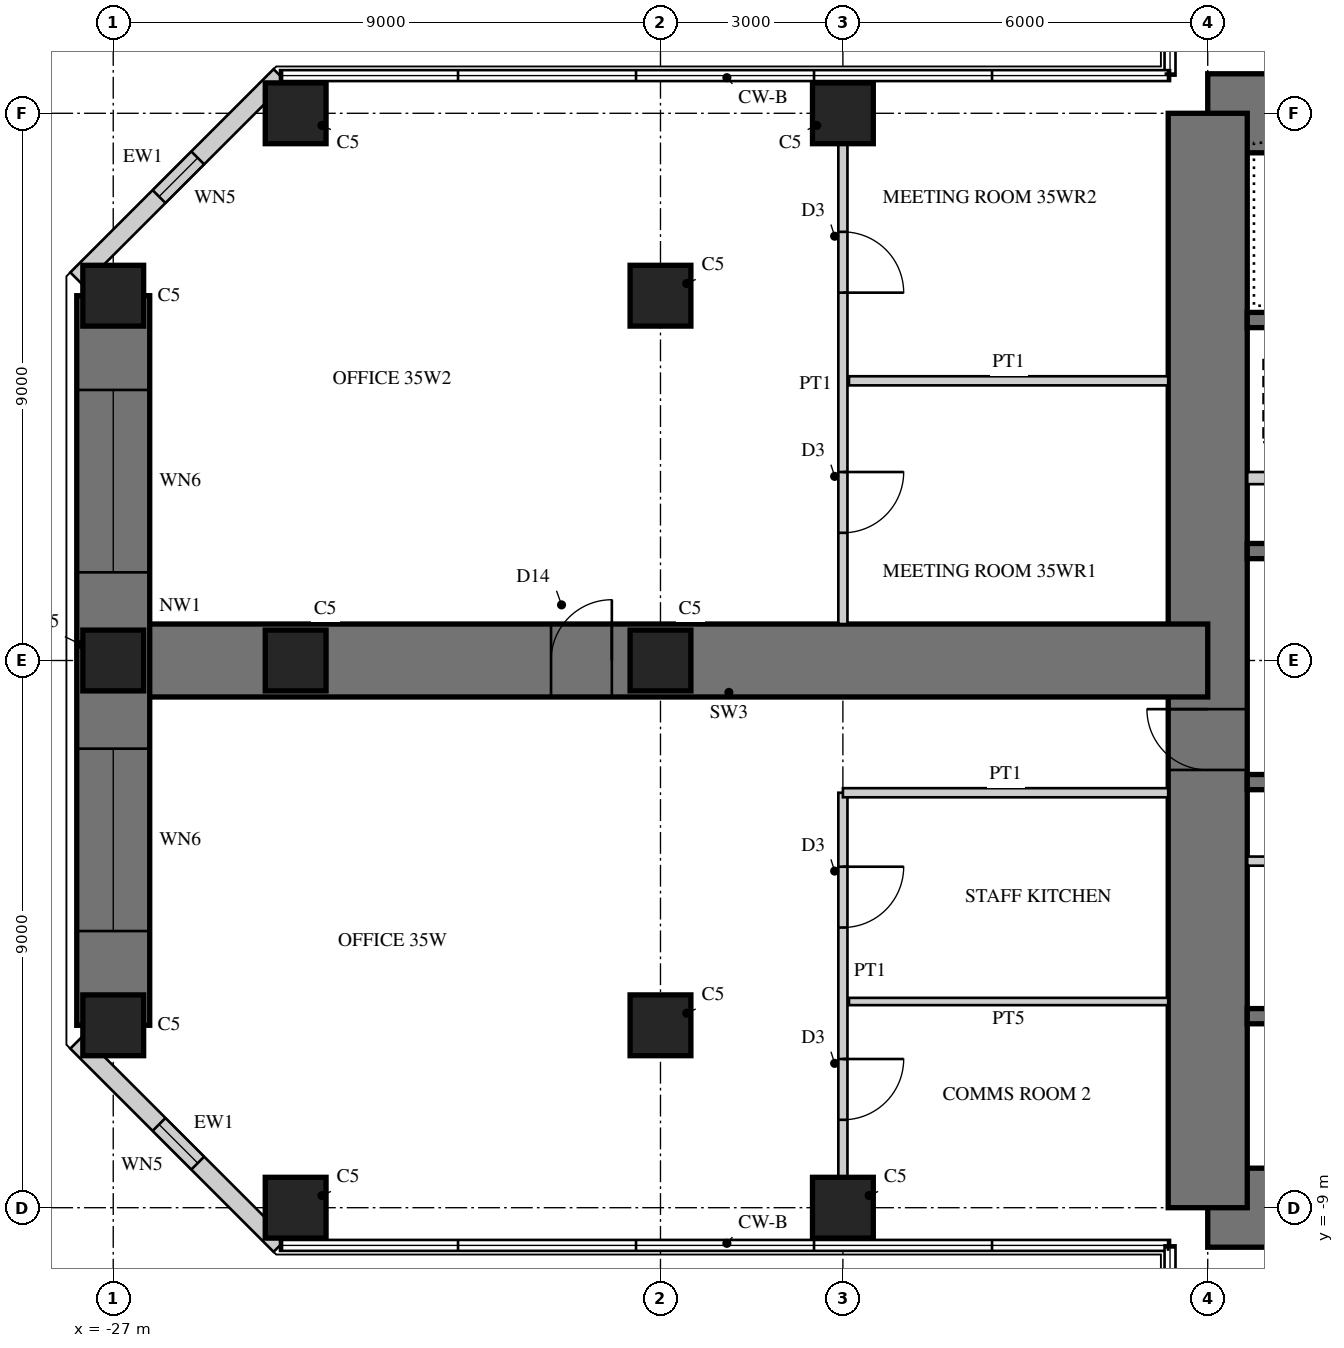
"""IFC4 building model, lengths in metres.
Left out: names, types, materials, properties, quantities, classifications, styles, units other than length and angle.
Written with IfcOpenShell. Run it as: python <this file> out.ifc"""

import sys

from ifc_helpers import new_model, si_unit, direction, frame, frame_2d, origin, origin_2d, place, context, subcontext, project, spatial, rectangle, hollow_rectangle, extrude, element, fill, save


model = new_model("IFC4")
c1 = context("Model", 3, precision=1e-05, world=origin(), true_north=direction((0.0, 1.0)))
c2 = subcontext(c1, "Body", "Model", "MODEL_VIEW")
j1 = project(units=[si_unit("LENGTHUNIT", "METRE"), si_unit("PLANEANGLEUNIT", "RADIAN")], contexts=[c1])
p1 = place(None, origin())
s1 = spatial("IfcSite", under=j1, at=p1, CompositionType="ELEMENT")
p2 = place(p1, origin())
s2 = spatial("IfcBuilding", under=s1, at=p2, CompositionType="ELEMENT")
p3 = place(p2, frame((0.0, 0.0, 144.5)))
s3 = spatial("IfcBuildingStorey", under=s2, at=p3, CompositionType="ELEMENT", Elevation=144.5)
p4 = place(p3, frame((9.0, 9.0, 0.0), z_axis=(0.0, 0.0, 1.0), x_axis=(-1.0, 0.0, 0.0)))
e1 = element("IfcWall", 1, at=p4, inside=s3, PredefinedType="SHEAR", context=c2, shape_type="SweptSolid", body=[
    extrude(rectangle(XDim=18.0, YDim=1.3, at=frame_2d((9.0, 0.0))), origin(), (0.0, 0.0, 1.0), 4.0),
])
p5 = place(p4, frame((9.8, 0.0, 0.0)))
e2 = element("IfcOpeningElement", 2, at=p5, cuts=e1, PredefinedType="OPENING", context=c2, shape_type="SweptSolid", body=[
    extrude(rectangle(XDim=1.0, YDim=2.4, at=frame_2d((0.5, 1.2))), frame((0.0, 0.66, 0.0), z_axis=(0.0, -1.0, 0.0), x_axis=(1.0, 0.0, 0.0)), (0.0, 0.0, 1.0), 1.32),
])
p6 = place(p3, frame((-9.0, -9.0, 0.0), z_axis=(0.0, 0.0, 1.0), x_axis=(1.0, 0.0, 0.0)))
e3 = element("IfcWall", 3, at=p6, inside=s3, PredefinedType="SHEAR", context=c2, shape_type="SweptSolid", body=[
    extrude(rectangle(XDim=18.0, YDim=1.3, at=frame_2d((9.0, 0.0))), origin(), (0.0, 0.0, 1.0), 4.0),
])
p7 = place(p6, frame((9.8, 0.0, 0.0)))
e4 = element("IfcOpeningElement", 4, at=p7, cuts=e3, PredefinedType="OPENING", context=c2, shape_type="SweptSolid", body=[
    extrude(rectangle(XDim=1.0, YDim=2.4, at=frame_2d((0.5, 1.2))), frame((0.0, 0.66, 0.0), z_axis=(0.0, -1.0, 0.0), x_axis=(1.0, 0.0, 0.0)), (0.0, 0.0, 1.0), 1.32),
])
p8 = place(p3, frame((-9.0, 9.0, 0.0), z_axis=(0.0, 0.0, 1.0), x_axis=(0.0, -1.0, 0.0)))
e5 = element("IfcWall", 5, at=p8, inside=s3, PredefinedType="SHEAR", context=c2, shape_type="SweptSolid", body=[
    extrude(rectangle(XDim=18.0, YDim=1.3, at=frame_2d((9.0, 0.0))), origin(), (0.0, 0.0, 1.0), 4.0),
])
p9 = place(p8, frame((9.8, 0.0, 0.0)))
e6 = element("IfcOpeningElement", 6, at=p9, cuts=e5, PredefinedType="OPENING", context=c2, shape_type="SweptSolid", body=[
    extrude(rectangle(XDim=1.0, YDim=2.4, at=frame_2d((0.5, 1.2))), frame((0.0, 0.66, 0.0), z_axis=(0.0, -1.0, 0.0), x_axis=(1.0, 0.0, 0.0)), (0.0, 0.0, 1.0), 1.32),
])
p10 = place(p3, frame((-2.125, 1.8, 0.0), z_axis=(0.0, 0.0, 1.0), x_axis=(-1.0, 0.0, 0.0)))
e7 = element("IfcWall", 7, at=p10, inside=s3, PredefinedType="SHEAR", context=c2, shape_type="SweptSolid", body=[
    extrude(rectangle(XDim=6.225, YDim=0.25, at=frame_2d((3.113, 0.0))), origin(), (0.0, 0.0, 1.0), 4.0),
])
p11 = place(p3, frame((-2.125, 5.6, 0.0), z_axis=(0.0, 0.0, 1.0), x_axis=(-1.0, 0.0, 0.0)))
e8 = element("IfcWall", 8, at=p11, inside=s3, PredefinedType="SHEAR", context=c2, shape_type="SweptSolid", body=[
    extrude(rectangle(XDim=6.225, YDim=0.25, at=frame_2d((3.113, 0.0))), origin(), (0.0, 0.0, 1.0), 4.0),
])
p12 = place(p11, frame((0.175, 0.0, 0.0)))
e9 = element("IfcOpeningElement", 9, at=p12, cuts=e8, PredefinedType="OPENING", context=c2, shape_type="SweptSolid", body=[
    extrude(rectangle(XDim=1.0, YDim=2.1, at=frame_2d((0.5, 1.05))), frame((0.0, 0.135, 0.0), z_axis=(0.0, -1.0, 0.0), x_axis=(1.0, 0.0, 0.0)), (0.0, 0.0, 1.0), 0.27),
])
p13 = place(p3, frame((-5.725, 3.0, 0.0), z_axis=(0.0, 0.0, 1.0), x_axis=(-1.0, 0.0, 0.0)))
e10 = element("IfcWall", 10, at=p13, inside=s3, PredefinedType="PARTITIONING", context=c2, shape_type="SweptSolid", body=[
    extrude(rectangle(XDim=2.625, YDim=0.2, at=frame_2d((1.312, 0.0))), origin(), (0.0, 0.0, 1.0), 4.0),
])
for number, where, z_axis, x_axis in (
    (11, (-1.925, -2.0, 0.0), (0.0, 0.0, 1.0), (-1.0, 0.0, 0.0)),
    (12, (-1.925, -5.85, 0.0), (0.0, 0.0, 1.0), (-1.0, 0.0, 0.0)),
):
    element("IfcWall", number, at=place(p3, frame(where, z_axis=z_axis, x_axis=x_axis)), inside=s3, PredefinedType="SHEAR", context=c2, shape_type="SweptSolid", body=[
        extrude(rectangle(XDim=6.425, YDim=0.25, at=frame_2d((3.212, 0.0))), origin(), (0.0, 0.0, 1.0), 4.0),
    ])
p14 = place(p3, frame((-1.925, -3.3, 0.0), z_axis=(0.0, 0.0, 1.0), x_axis=(-1.0, 0.0, 0.0)))
e13 = element("IfcWall", 13, at=p14, inside=s3, PredefinedType="PARTITIONING", context=c2, shape_type="SweptSolid", body=[
    extrude(rectangle(XDim=6.425, YDim=0.15, at=frame_2d((3.212, 0.0))), origin(), (0.0, 0.0, 1.0), 4.0),
])
p15 = place(p14, frame((0.075, 0.0, 0.0)))
e14 = element("IfcOpeningElement", 14, at=p15, cuts=e13, PredefinedType="OPENING", context=c2, shape_type="SweptSolid", body=[
    extrude(rectangle(XDim=0.8, YDim=2.1, at=frame_2d((0.4, 1.05))), frame((0.0, 0.085, 0.0), z_axis=(0.0, -1.0, 0.0), x_axis=(1.0, 0.0, 0.0)), (0.0, 0.0, 1.0), 0.17),
])
p16 = place(p14, frame((3.675, 0.0, 0.0)))
e15 = element("IfcOpeningElement", 15, at=p16, cuts=e13, PredefinedType="OPENING", context=c2, shape_type="SweptSolid", body=[
    extrude(rectangle(XDim=0.8, YDim=2.1, at=frame_2d((0.4, 1.05))), frame((0.0, 0.085, 0.0), z_axis=(0.0, -1.0, 0.0), x_axis=(1.0, 0.0, 0.0)), (0.0, 0.0, 1.0), 0.17),
])
p17 = place(p3, frame((-9.0, 0.0, 0.0), z_axis=(0.0, 0.0, 1.0), x_axis=(-1.0, 0.0, 0.0)))
e16 = element("IfcWall", 16, at=p17, inside=s3, PredefinedType="SHEAR", context=c2, shape_type="SweptSolid", body=[
    extrude(rectangle(XDim=18.0, YDim=1.2, at=frame_2d((9.0, 0.0))), origin(), (0.0, 0.0, 1.0), 4.0),
])
p18 = place(p17, frame((9.8, 0.0, 0.0)))
e17 = element("IfcOpeningElement", 17, at=p18, cuts=e16, PredefinedType="OPENING", context=c2, shape_type="SweptSolid", body=[
    extrude(rectangle(XDim=1.0, YDim=2.2, at=frame_2d((0.5, 1.1))), frame((0.0, 0.61, 0.0), z_axis=(0.0, -1.0, 0.0), x_axis=(1.0, 0.0, 0.0)), (0.0, 0.0, 1.0), 1.22),
])
p19 = place(p3, frame((-27.0, 6.0, 0.0), z_axis=(0.0, 0.0, 1.0), x_axis=(0.0, -1.0, 0.0)))
e18 = element("IfcWall", 18, at=p19, inside=s3, PredefinedType="SHEAR", context=c2, shape_type="SweptSolid", body=[
    extrude(rectangle(XDim=12.0, YDim=1.2, at=frame_2d((6.0, 0.0))), origin(), (0.0, 0.0, 1.0), 4.0),
])
p20 = place(p19, frame((1.55, 0.0, 0.6)))
e19 = element("IfcOpeningElement", 19, at=p20, cuts=e18, PredefinedType="OPENING", context=c2, shape_type="SweptSolid", body=[
    extrude(rectangle(XDim=3.0, YDim=2.4, at=frame_2d((1.5, 1.2))), frame((0.0, 0.61, 0.0), z_axis=(0.0, -1.0, 0.0), x_axis=(1.0, 0.0, 0.0)), (0.0, 0.0, 1.0), 1.22),
])
p21 = place(p19, frame((7.45, 0.0, 0.6)))
e20 = element("IfcOpeningElement", 20, at=p21, cuts=e18, PredefinedType="OPENING", context=c2, shape_type="SweptSolid", body=[
    extrude(rectangle(XDim=3.0, YDim=2.4, at=frame_2d((1.5, 1.2))), frame((0.0, 0.61, 0.0), z_axis=(0.0, -1.0, 0.0), x_axis=(1.0, 0.0, 0.0)), (0.0, 0.0, 1.0), 1.22),
])
for number, where, z_axis, x_axis in (
    (21, (-15.0, 9.0, 0.0), (0.0, 0.0, 1.0), (1.0, 0.0, 0.0)),
    (22, (-24.0, 9.0, 0.0), (0.0, 0.0, 1.0), (1.0, 0.0, 0.0)),
    (23, (-15.0, -9.0, 0.0), (0.0, 0.0, 1.0), (1.0, 0.0, 0.0)),
    (24, (-24.0, -9.0, 0.0), (0.0, 0.0, 1.0), (1.0, 0.0, 0.0)),
    (25, (-27.0, 6.0, 0.0), (0.0, 0.0, 1.0), (1.0, 0.0, 0.0)),
    (26, (-27.0, 0.0, 0.0), (0.0, 0.0, 1.0), (1.0, 0.0, 0.0)),
    (27, (-27.0, -6.0, 0.0), (0.0, 0.0, 1.0), (1.0, 0.0, 0.0)),
    (28, (-18.0, 6.0, 0.0), (0.0, 0.0, 1.0), (1.0, 0.0, 0.0)),
    (29, (-18.0, 0.0, 0.0), (0.0, 0.0, 1.0), (1.0, 0.0, 0.0)),
    (30, (-18.0, -6.0, 0.0), (0.0, 0.0, 1.0), (1.0, 0.0, 0.0)),
    (31, (-24.0, 0.0, 0.0), (0.0, 0.0, 1.0), (1.0, 0.0, 0.0)),
):
    element("IfcColumn", number, at=place(p3, frame(where, z_axis=z_axis, x_axis=x_axis)), inside=s3, PredefinedType="COLUMN", context=c2, shape_type="SweptSolid", body=[
        extrude(rectangle(XDim=1.0, YDim=1.0, at=origin_2d()), origin(), (0.0, 0.0, 1.0), 4.0),
    ])
p22 = place(p3, frame((-24.257, 9.62, 0.0), z_axis=(0.0, 0.0, 1.0), x_axis=(-0.707106781187, -0.707106781187, 0.0)))
e32 = element("IfcWall", 32, at=p22, inside=s3, PredefinedType="SOLIDWALL", context=c2, shape_type="SweptSolid", body=[
    extrude(rectangle(XDim=4.728, YDim=0.3, at=frame_2d((2.364, 0.0))), origin(), (0.0, 0.0, 1.0), 3.8),
])
p23 = place(p22, frame((1.914, 0.0, 0.3)))
e33 = element("IfcOpeningElement", 33, at=p23, cuts=e32, PredefinedType="OPENING", context=c2, shape_type="SweptSolid", body=[
    extrude(rectangle(XDim=0.9, YDim=2.4, at=frame_2d((0.45, 1.2))), frame((0.0, 0.16, 0.0), z_axis=(0.0, -1.0, 0.0), x_axis=(1.0, 0.0, 0.0)), (0.0, 0.0, 1.0), 0.32),
])
p24 = place(p3, frame((-27.6, -6.277, 0.0), z_axis=(0.0, 0.0, 1.0), x_axis=(0.707106781187, -0.707106781187, 0.0)))
e34 = element("IfcWall", 34, at=p24, inside=s3, PredefinedType="SOLIDWALL", context=c2, shape_type="SweptSolid", body=[
    extrude(rectangle(XDim=4.728, YDim=0.3, at=frame_2d((2.364, 0.0))), origin(), (0.0, 0.0, 1.0), 3.8),
])
p25 = place(p24, frame((1.914, 0.0, 0.3)))
e35 = element("IfcOpeningElement", 35, at=p25, cuts=e34, PredefinedType="OPENING", context=c2, shape_type="SweptSolid", body=[
    extrude(rectangle(XDim=0.9, YDim=2.4, at=frame_2d((0.45, 1.2))), frame((0.0, 0.16, 0.0), z_axis=(0.0, -1.0, 0.0), x_axis=(1.0, 0.0, 0.0)), (0.0, 0.0, 1.0), 0.32),
])
p26 = place(p3, frame((-15.0, -2.175, 0.0), z_axis=(0.0, 0.0, 1.0), x_axis=(0.0, -1.0, 0.0)))
e36 = element("IfcWall", 36, at=p26, inside=s3, PredefinedType="PARTITIONING", context=c2, shape_type="SweptSolid", body=[
    extrude(rectangle(XDim=6.325, YDim=0.15, at=frame_2d((3.163, 0.0))), origin(), (0.0, 0.0, 1.0), 3.0),
])
p27 = place(p26, frame((1.217, 0.0, 0.0)))
e37 = element("IfcOpeningElement", 37, at=p27, cuts=e36, PredefinedType="OPENING", context=c2, shape_type="SweptSolid", body=[
    extrude(rectangle(XDim=1.0, YDim=2.1, at=frame_2d((0.5, 1.05))), frame((0.0, 0.085, 0.0), z_axis=(0.0, -1.0, 0.0), x_axis=(1.0, 0.0, 0.0)), (0.0, 0.0, 1.0), 0.17),
])
p28 = place(p26, frame((4.379, 0.0, 0.0)))
e38 = element("IfcOpeningElement", 38, at=p28, cuts=e36, PredefinedType="OPENING", context=c2, shape_type="SweptSolid", body=[
    extrude(rectangle(XDim=1.0, YDim=2.1, at=frame_2d((0.5, 1.05))), frame((0.0, 0.085, 0.0), z_axis=(0.0, -1.0, 0.0), x_axis=(1.0, 0.0, 0.0)), (0.0, 0.0, 1.0), 0.17),
])
p29 = place(p3, frame((-9.65, -2.175, 0.0), z_axis=(0.0, 0.0, 1.0), x_axis=(-1.0, 0.0, 0.0)))
e39 = element("IfcWall", 39, at=p29, inside=s3, PredefinedType="PARTITIONING", context=c2, shape_type="SweptSolid", body=[
    extrude(rectangle(XDim=5.35, YDim=0.15, at=frame_2d((2.675, 0.0))), origin(), (0.0, 0.0, 1.0), 3.8),
])
p30 = place(p3, frame((-9.65, -5.609, 0.0), z_axis=(0.0, 0.0, 1.0), x_axis=(-1.0, 0.0, 0.0)))
e40 = element("IfcWall", 40, at=p30, inside=s3, PredefinedType="PLUMBINGWALL", context=c2, shape_type="SweptSolid", body=[
    extrude(rectangle(XDim=5.25, YDim=0.12, at=frame_2d((2.625, 0.0))), origin(), (0.0, 0.0, 1.0), 3.8),
])
p31 = place(p3, frame((-15.0, 8.5, 0.0), z_axis=(0.0, 0.0, 1.0), x_axis=(0.0, -1.0, 0.0)))
e41 = element("IfcWall", 41, at=p31, inside=s3, PredefinedType="PARTITIONING", context=c2, shape_type="SweptSolid", body=[
    extrude(rectangle(XDim=7.9, YDim=0.15, at=frame_2d((3.95, 0.0))), origin(), (0.0, 0.0, 1.0), 3.0),
])
p32 = place(p31, frame((1.45, 0.0, 0.0)))
e42 = element("IfcOpeningElement", 42, at=p32, cuts=e41, PredefinedType="OPENING", context=c2, shape_type="SweptSolid", body=[
    extrude(rectangle(XDim=1.0, YDim=2.1, at=frame_2d((0.5, 1.05))), frame((0.0, 0.085, 0.0), z_axis=(0.0, -1.0, 0.0), x_axis=(1.0, 0.0, 0.0)), (0.0, 0.0, 1.0), 0.17),
])
p33 = place(p31, frame((5.4, 0.0, 0.0)))
e43 = element("IfcOpeningElement", 43, at=p33, cuts=e41, PredefinedType="OPENING", context=c2, shape_type="SweptSolid", body=[
    extrude(rectangle(XDim=1.0, YDim=2.1, at=frame_2d((0.5, 1.05))), frame((0.0, 0.085, 0.0), z_axis=(0.0, -1.0, 0.0), x_axis=(1.0, 0.0, 0.0)), (0.0, 0.0, 1.0), 0.17),
])
p34 = place(p3, frame((-9.65, 4.6, 0.0), z_axis=(0.0, 0.0, 1.0), x_axis=(-1.0, 0.0, 0.0)))
e44 = element("IfcWall", 44, at=p34, inside=s3, PredefinedType="PARTITIONING", context=c2, shape_type="SweptSolid", body=[
    extrude(rectangle(XDim=5.25, YDim=0.15, at=frame_2d((2.625, 0.0))), origin(), (0.0, 0.0, 1.0), 3.8),
])
p35 = place(p23, origin())
e45 = element("IfcWindow", 45, at=p35, inside=s3, PartitioningType="SINGLE_PANEL", PredefinedType="WINDOW", context=c2, shape_type="SweptSolid", body=[
    extrude(hollow_rectangle(XDim=0.9, YDim=2.4, WallThickness=0.06, at=frame_2d((0.45, 1.2))), frame((0.0, 0.03, 0.0), z_axis=(0.0, -1.0, 0.0), x_axis=(1.0, 0.0, 0.0)), (0.0, 0.0, 1.0), 0.06),
    extrude(rectangle(XDim=0.779, YDim=2.279, at=frame_2d((0.45, 1.2))), frame((0.0, 0.03, 0.0), z_axis=(0.0, -1.0, 0.0), x_axis=(1.0, 0.0, 0.0)), (0.0, 0.0, 1.0), 0.06),
])
fill(e33, e45)
p36 = place(p20, origin())
e46 = element("IfcWindow", 46, at=p36, inside=s3, PartitioningType="SINGLE_PANEL", PredefinedType="WINDOW", context=c2, shape_type="SweptSolid", body=[
    extrude(hollow_rectangle(XDim=3.0, YDim=2.4, WallThickness=0.06, at=frame_2d((1.5, 1.2))), frame((0.0, 0.03, 0.0), z_axis=(0.0, -1.0, 0.0), x_axis=(1.0, 0.0, 0.0)), (0.0, 0.0, 1.0), 0.06),
    extrude(rectangle(XDim=2.879, YDim=2.279, at=frame_2d((1.5, 1.2))), frame((0.0, 0.03, 0.0), z_axis=(0.0, -1.0, 0.0), x_axis=(1.0, 0.0, 0.0)), (0.0, 0.0, 1.0), 0.06),
])
fill(e19, e46)
p37 = place(p21, origin())
e47 = element("IfcWindow", 47, at=p37, inside=s3, PartitioningType="SINGLE_PANEL", PredefinedType="WINDOW", context=c2, shape_type="SweptSolid", body=[
    extrude(hollow_rectangle(XDim=3.0, YDim=2.4, WallThickness=0.06, at=frame_2d((1.5, 1.2))), frame((0.0, 0.03, 0.0), z_axis=(0.0, -1.0, 0.0), x_axis=(1.0, 0.0, 0.0)), (0.0, 0.0, 1.0), 0.06),
    extrude(rectangle(XDim=2.879, YDim=2.279, at=frame_2d((1.5, 1.2))), frame((0.0, 0.03, 0.0), z_axis=(0.0, -1.0, 0.0), x_axis=(1.0, 0.0, 0.0)), (0.0, 0.0, 1.0), 0.06),
])
fill(e20, e47)
p38 = place(p25, origin())
e48 = element("IfcWindow", 48, at=p38, inside=s3, PartitioningType="SINGLE_PANEL", PredefinedType="WINDOW", context=c2, shape_type="SweptSolid", body=[
    extrude(hollow_rectangle(XDim=0.9, YDim=2.4, WallThickness=0.06, at=frame_2d((0.45, 1.2))), frame((0.0, 0.03, 0.0), z_axis=(0.0, -1.0, 0.0), x_axis=(1.0, 0.0, 0.0)), (0.0, 0.0, 1.0), 0.06),
    extrude(rectangle(XDim=0.779, YDim=2.279, at=frame_2d((0.45, 1.2))), frame((0.0, 0.03, 0.0), z_axis=(0.0, -1.0, 0.0), x_axis=(1.0, 0.0, 0.0)), (0.0, 0.0, 1.0), 0.06),
])
fill(e35, e48)
p39 = place(p27, origin())
e49 = element("IfcDoor", 49, at=p39, inside=s3, OperationType="SINGLE_SWING_LEFT", PredefinedType="DOOR", context=c2, shape_type="SweptSolid", body=[
    extrude(rectangle(XDim=1.0, YDim=2.1, at=frame_2d((0.5, 1.05))), frame((0.0, 0.025, 0.0), z_axis=(0.0, -1.0, 0.0), x_axis=(1.0, 0.0, 0.0)), (0.0, 0.0, 1.0), 0.05),
])
fill(e37, e49)
p40 = place(p28, origin())
e50 = element("IfcDoor", 50, at=p40, inside=s3, OperationType="SINGLE_SWING_LEFT", PredefinedType="DOOR", context=c2, shape_type="SweptSolid", body=[
    extrude(rectangle(XDim=1.0, YDim=2.1, at=frame_2d((0.5, 1.05))), frame((0.0, 0.025, 0.0), z_axis=(0.0, -1.0, 0.0), x_axis=(1.0, 0.0, 0.0)), (0.0, 0.0, 1.0), 0.05),
])
fill(e38, e50)
p41 = place(p32, origin())
e51 = element("IfcDoor", 51, at=p41, inside=s3, OperationType="SINGLE_SWING_RIGHT", PredefinedType="DOOR", context=c2, shape_type="SweptSolid", body=[
    extrude(rectangle(XDim=1.0, YDim=2.1, at=frame_2d((0.5, 1.05))), frame((0.0, 0.025, 0.0), z_axis=(0.0, -1.0, 0.0), x_axis=(1.0, 0.0, 0.0)), (0.0, 0.0, 1.0), 0.05),
])
fill(e42, e51)
p42 = place(p33, origin())
e52 = element("IfcDoor", 52, at=p42, inside=s3, OperationType="SINGLE_SWING_LEFT", PredefinedType="DOOR", context=c2, shape_type="SweptSolid", body=[
    extrude(rectangle(XDim=1.0, YDim=2.1, at=frame_2d((0.5, 1.05))), frame((0.0, 0.025, 0.0), z_axis=(0.0, -1.0, 0.0), x_axis=(1.0, 0.0, 0.0)), (0.0, 0.0, 1.0), 0.05),
])
fill(e43, e52)
p43 = place(p18, frame((1.0, 0.0, 0.0), z_axis=(0.0, 0.0, 1.0), x_axis=(-1.0, 0.0, 0.0)))
e53 = element("IfcDoor", 53, at=p43, inside=s3, OperationType="SINGLE_SWING_RIGHT", PredefinedType="DOOR", context=c2, shape_type="SweptSolid", body=[
    extrude(rectangle(XDim=1.0, YDim=2.2, at=frame_2d((0.5, 1.1))), frame((0.0, 0.025, 0.0), z_axis=(0.0, -1.0, 0.0), x_axis=(1.0, 0.0, 0.0)), (0.0, 0.0, 1.0), 0.05),
])
fill(e17, e53)
p44 = place(p9, frame((1.0, 0.0, 0.0), z_axis=(0.0, 0.0, 1.0), x_axis=(-1.0, 0.0, 0.0)))
e54 = element("IfcDoor", 54, at=p44, inside=s3, OperationType="SINGLE_SWING_RIGHT", PredefinedType="DOOR", context=c2, shape_type="SweptSolid", body=[
    extrude(rectangle(XDim=1.0, YDim=2.4, at=frame_2d((0.5, 1.2))), frame((0.0, -0.005, 0.0), z_axis=(0.0, -1.0, 0.0), x_axis=(1.0, 0.0, 0.0)), (0.0, 0.0, 1.0), 0.05),
])
fill(e6, e54)
save(model, sys.argv[1])
